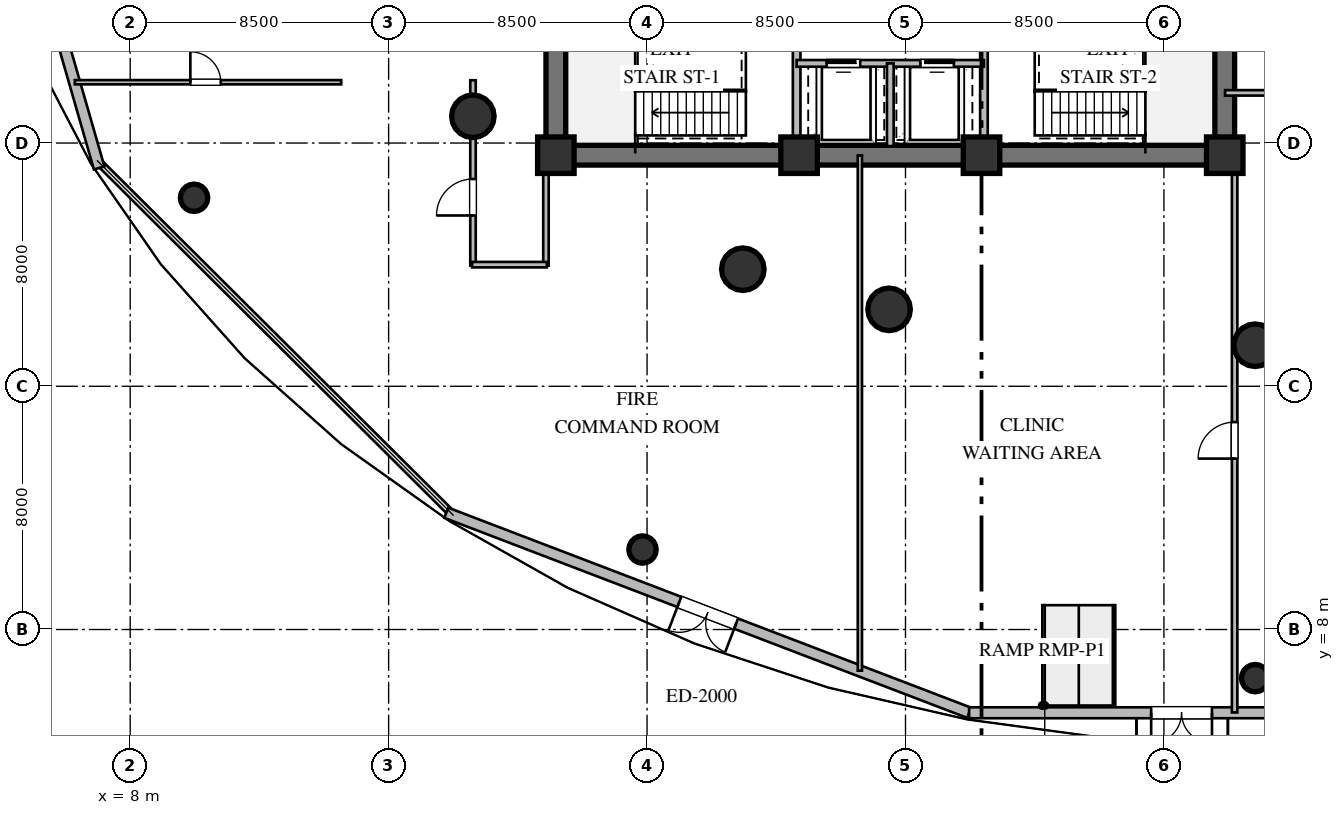
"""IFC4 building model, lengths in metres.
Left out: names, types, materials, properties, quantities, classifications, styles, units other than length and angle.
Written with IfcOpenShell. Run it as: python <this file> out.ifc"""

import sys

from ifc_helpers import new_model, si_unit, direction, frame, frame_2d, origin, origin_2d, place, context, subcontext, project, spatial, rectangle, circle, extrude, element, fill, save


model = new_model("IFC4")
c1 = context("Model", 3, precision=1e-05, world=origin(), true_north=direction((0.0, 1.0)))
c2 = subcontext(c1, "Body", "Model", "MODEL_VIEW")
j1 = project(units=[si_unit("LENGTHUNIT", "METRE"), si_unit("PLANEANGLEUNIT", "RADIAN")], contexts=[c1])
p1 = place(None, origin())
s1 = spatial("IfcSite", under=j1, at=p1, CompositionType="ELEMENT")
p2 = place(p1, origin())
s2 = spatial("IfcBuilding", under=s1, at=p2, CompositionType="ELEMENT")
p3 = place(p2, origin())
s3 = spatial("IfcBuildingStorey", under=s2, at=p3, CompositionType="ELEMENT", Elevation=0.0)
p4 = place(p3, frame((21.675, 23.6, 0.0), z_axis=(0.0, 0.0, 1.0), x_axis=(1.0, 0.0, 0.0)))
e1 = element("IfcWall", 1, at=p4, inside=s3, PredefinedType="SHEAR", context=c2, shape_type="SweptSolid", body=[
    extrude(rectangle(XDim=22.65, YDim=0.65, at=frame_2d((11.325, 0.0))), origin(), (0.0, 0.0, 1.0), 4.52),
])
p5 = place(p3, frame((22.0, 23.925, 0.0), z_axis=(0.0, 0.0, 1.0), x_axis=(0.0, 1.0, 0.0)))
e2 = element("IfcWall", 2, at=p5, inside=s3, PredefinedType="SHEAR", context=c2, shape_type="SweptSolid", body=[
    extrude(rectangle(XDim=12.15, YDim=0.65, at=frame_2d((6.075, 0.0))), origin(), (0.0, 0.0, 1.0), 4.52),
])
p6 = place(p3, frame((44.0, 23.925, 0.0), z_axis=(0.0, 0.0, 1.0), x_axis=(0.0, 1.0, 0.0)))
e3 = element("IfcWall", 3, at=p6, inside=s3, PredefinedType="SHEAR", context=c2, shape_type="SweptSolid", body=[
    extrude(rectangle(XDim=12.15, YDim=0.65, at=frame_2d((6.075, 0.0))), origin(), (0.0, 0.0, 1.0), 4.52),
])
p7 = place(p6, frame((8.775, 0.0, 0.0)))
e4 = element("IfcOpeningElement", 4, at=p7, cuts=e3, PredefinedType="OPENING", context=c2, shape_type="SweptSolid", body=[
    extrude(rectangle(XDim=1.5, YDim=2.15, at=frame_2d((0.75, 1.075))), frame((0.0, 0.335, 0.0), z_axis=(0.0, -1.0, 0.0), x_axis=(1.0, 0.0, 0.0)), (0.0, 0.0, 1.0), 0.67),
])
for number, where, z_axis, x_axis in (
    (5, (22.0, 23.6, 0.0), (0.0, 0.0, 1.0), (1.0, 0.0, 0.0)),
    (6, (30.0, 23.6, 0.0), (0.0, 0.0, 1.0), (1.0, 0.0, 0.0)),
    (7, (36.0, 23.6, 0.0), (0.0, 0.0, 1.0), (1.0, 0.0, 0.0)),
    (8, (44.0, 23.6, 0.0), (0.0, 0.0, 1.0), (1.0, 0.0, 0.0)),
):
    element("IfcColumn", number, at=place(p3, frame(where, z_axis=z_axis, x_axis=x_axis)), inside=s3, PredefinedType="COLUMN", context=c2, shape_type="SweptSolid", body=[
        extrude(rectangle(XDim=1.2, YDim=1.2, at=origin_2d()), origin(), (0.0, 0.0, 1.0), 4.8),
    ])
for number, where, z_axis, x_axis in (
    (9, (19.27, 24.88, 0.0), (0.0, 0.0, 1.0), (1.0, 0.0, 0.0)),
    (10, (28.15, 19.85, 0.0), (0.0, 0.0, 1.0), (1.0, 0.0, 0.0)),
    (11, (32.96, 18.53, 0.0), (0.0, 0.0, 1.0), (1.0, 0.0, 0.0)),
    (12, (45.0, 17.35, 0.0), (0.0, 0.0, 1.0), (1.0, 0.0, 0.0)),
):
    element("IfcColumn", number, at=place(p3, frame(where, z_axis=z_axis, x_axis=x_axis)), inside=s3, PredefinedType="COLUMN", context=c2, shape_type="SweptSolid", body=[
        extrude(circle(Radius=0.7, at=origin_2d()), origin(), (0.0, 0.0, 1.0), 4.8),
    ])
for number, where, z_axis, x_axis in (
    (13, (10.1, 22.2, 0.0), (0.0, 0.0, 1.0), (1.0, 0.0, 0.0)),
    (14, (24.85, 10.63, 0.0), (0.0, 0.0, 1.0), (1.0, 0.0, 0.0)),
    (15, (45.0, 6.4, 0.0), (0.0, 0.0, 1.0), (1.0, 0.0, 0.0)),
):
    element("IfcColumn", number, at=place(p3, frame(where, z_axis=z_axis, x_axis=x_axis)), inside=s3, PredefinedType="COLUMN", context=c2, shape_type="SweptSolid", body=[
        extrude(circle(Radius=0.45, at=origin_2d()), origin(), (0.0, 0.0, 1.0), 4.8),
    ])
p8 = place(p3, frame((2.72, 38.0, 0.0), z_axis=(0.0, 0.0, 1.0), x_axis=(0.276203409751, -0.961099202186, 0.0)))
e16 = element("IfcWall", 16, at=p8, inside=s3, PredefinedType="STANDARD", context=c2, shape_type="SweptSolid", body=[
    extrude(rectangle(XDim=15.42, YDim=0.36, at=frame_2d((7.71, 0.0))), origin(), (0.0, 0.0, 1.0), 4.52),
])
p9 = place(p8, frame((6.81, 0.0, 1.05)))
e17 = element("IfcOpeningElement", 17, at=p9, cuts=e16, PredefinedType="OPENING", context=c2, shape_type="SweptSolid", body=[
    extrude(rectangle(XDim=1.8, YDim=1.7, at=frame_2d((0.9, 0.85))), frame((0.0, 0.19, 0.0), z_axis=(0.0, -1.0, 0.0), x_axis=(1.0, 0.0, 0.0)), (0.0, 0.0, 1.0), 0.38),
])
p10 = place(p3, frame((35.592, 5.262, 0.0), z_axis=(0.0, 0.0, 1.0), x_axis=(-0.934012147289, 0.357241247221, 0.0)))
e18 = element("IfcWall", 18, at=p10, inside=s3, PredefinedType="STANDARD", context=c2, shape_type="SweptSolid", body=[
    extrude(rectangle(XDim=18.411, YDim=0.36, at=frame_2d((9.206, 0.0))), origin(), (0.0, 0.0, 1.0), 4.52),
])
p11 = place(p10, frame((8.205, 0.0, 0.0)))
e19 = element("IfcOpeningElement", 19, at=p11, cuts=e18, PredefinedType="OPENING", context=c2, shape_type="SweptSolid", body=[
    extrude(rectangle(XDim=2.0, YDim=2.2, at=frame_2d((1.0, 1.1))), frame((0.0, 0.19, 0.0), z_axis=(0.0, -1.0, 0.0), x_axis=(1.0, 0.0, 0.0)), (0.0, 0.0, 1.0), 0.38),
])
p12 = place(p3, frame((54.408, 5.262, 0.0), z_axis=(0.0, 0.0, 1.0), x_axis=(-1.0, 0.0, 0.0)))
e20 = element("IfcWall", 20, at=p12, inside=s3, PredefinedType="STANDARD", context=c2, shape_type="SweptSolid", body=[
    extrude(rectangle(XDim=18.816, YDim=0.36, at=frame_2d((9.408, 0.0))), origin(), (0.0, 0.0, 1.0), 4.52),
])
p13 = place(p12, frame((10.828, 0.0, 0.0)))
e21 = element("IfcOpeningElement", 21, at=p13, cuts=e20, PredefinedType="OPENING", context=c2, shape_type="SweptSolid", body=[
    extrude(rectangle(XDim=2.0, YDim=2.2, at=frame_2d((1.0, 1.1))), frame((0.0, 0.19, 0.0), z_axis=(0.0, -1.0, 0.0), x_axis=(1.0, 0.0, 0.0)), (0.0, 0.0, 1.0), 0.38),
])
p14 = place(p3, frame((29.92, 23.9, 0.0), z_axis=(0.0, 0.0, 1.0), x_axis=(0.0, 1.0, 0.0)))
e22 = element("IfcWall", 22, at=p14, inside=s3, PredefinedType="SOLIDWALL", context=c2, shape_type="SweptSolid", body=[
    extrude(rectangle(XDim=5.4, YDim=0.25, at=frame_2d((2.7, 0.0))), origin(), (0.0, 0.0, 1.0), 4.52),
])
p15 = place(p14, frame((3.421, 0.0, 0.0)))
e23 = element("IfcOpeningElement", 23, at=p15, cuts=e22, PredefinedType="OPENING", context=c2, shape_type="SweptSolid", body=[
    extrude(rectangle(XDim=1.15, YDim=2.1, at=frame_2d((0.575, 1.05))), frame((0.0, 0.135, 0.0), z_axis=(0.0, -1.0, 0.0), x_axis=(1.0, 0.0, 0.0)), (0.0, 0.0, 1.0), 0.27),
])
p16 = place(p3, frame((36.08, 23.9, 0.0), z_axis=(0.0, 0.0, 1.0), x_axis=(0.0, 1.0, 0.0)))
e24 = element("IfcWall", 24, at=p16, inside=s3, PredefinedType="SOLIDWALL", context=c2, shape_type="SweptSolid", body=[
    extrude(rectangle(XDim=5.4, YDim=0.25, at=frame_2d((2.7, 0.0))), origin(), (0.0, 0.0, 1.0), 4.52),
])
p17 = place(p16, frame((3.421, 0.0, 0.0)))
e25 = element("IfcOpeningElement", 25, at=p17, cuts=e24, PredefinedType="OPENING", context=c2, shape_type="SweptSolid", body=[
    extrude(rectangle(XDim=1.15, YDim=2.1, at=frame_2d((0.575, 1.05))), frame((0.0, 0.135, 0.0), z_axis=(0.0, -1.0, 0.0), x_axis=(1.0, 0.0, 0.0)), (0.0, 0.0, 1.0), 0.27),
])
p18 = place(p3, frame((29.92, 26.62, 0.0), z_axis=(0.0, 0.0, 1.0), x_axis=(1.0, 0.0, 0.0)))
e26 = element("IfcWall", 26, at=p18, inside=s3, PredefinedType="SOLIDWALL", context=c2, shape_type="SweptSolid", body=[
    extrude(rectangle(XDim=6.16, YDim=0.22, at=frame_2d((3.08, 0.0))), origin(), (0.0, 0.0, 1.0), 4.52),
])
p19 = place(p18, frame((0.99, 0.0, 0.0)))
e27 = element("IfcOpeningElement", 27, at=p19, cuts=e26, PredefinedType="OPENING", context=c2, shape_type="SweptSolid", body=[
    extrude(rectangle(XDim=1.1, YDim=2.1, at=frame_2d((0.55, 1.05))), frame((0.0, 0.12, 0.0), z_axis=(0.0, -1.0, 0.0), x_axis=(1.0, 0.0, 0.0)), (0.0, 0.0, 1.0), 0.24),
])
p20 = place(p18, frame((4.07, 0.0, 0.0)))
e28 = element("IfcOpeningElement", 28, at=p20, cuts=e26, PredefinedType="OPENING", context=c2, shape_type="SweptSolid", body=[
    extrude(rectangle(XDim=1.1, YDim=2.1, at=frame_2d((0.55, 1.05))), frame((0.0, 0.12, 0.0), z_axis=(0.0, -1.0, 0.0), x_axis=(1.0, 0.0, 0.0)), (0.0, 0.0, 1.0), 0.24),
])
p21 = place(p3, frame((33.0, 23.9, 0.0), z_axis=(0.0, 0.0, 1.0), x_axis=(0.0, 1.0, 0.0)))
e29 = element("IfcWall", 29, at=p21, inside=s3, PredefinedType="SOLIDWALL", context=c2, shape_type="SweptSolid", body=[
    extrude(rectangle(XDim=2.72, YDim=0.22, at=frame_2d((1.36, 0.0))), origin(), (0.0, 0.0, 1.0), 4.52),
])
p22 = place(p3, frame((62.415, 25.65, 0.0), z_axis=(0.0, 0.0, 1.0), x_axis=(-1.0, 0.0, 0.0)))
e30 = element("IfcWall", 30, at=p22, inside=s3, PredefinedType="PARTITIONING", context=c2, shape_type="SweptSolid", body=[
    extrude(rectangle(XDim=18.405, YDim=0.18, at=frame_2d((9.203, 0.0))), origin(), (0.0, 0.0, 1.0), 3.966),
])
p23 = place(p22, frame((8.46, 0.0, 0.0)))
e31 = element("IfcOpeningElement", 31, at=p23, cuts=e30, PredefinedType="OPENING", context=c2, shape_type="SweptSolid", body=[
    extrude(rectangle(XDim=1.2, YDim=2.15, at=frame_2d((0.6, 1.075))), frame((0.0, 0.1, 0.0), z_axis=(0.0, -1.0, 0.0), x_axis=(1.0, 0.0, 0.0)), (0.0, 0.0, 1.0), 0.2),
])
p24 = place(p3, frame((19.275, 19.97, 0.0), z_axis=(0.0, 0.0, 1.0), x_axis=(0.0, 1.0, 0.0)))
e32 = element("IfcWall", 32, at=p24, inside=s3, PredefinedType="PARTITIONING", context=c2, shape_type="SweptSolid", body=[
    extrude(rectangle(XDim=6.095, YDim=0.18, at=frame_2d((3.047, 0.0))), origin(), (0.0, 0.0, 1.0), 3.898),
])
p25 = place(p24, frame((1.647, 0.0, 0.0)))
e33 = element("IfcOpeningElement", 33, at=p25, cuts=e32, PredefinedType="OPENING", context=c2, shape_type="SweptSolid", body=[
    extrude(rectangle(XDim=1.2, YDim=2.15, at=frame_2d((0.6, 1.075))), frame((0.0, 0.1, 0.0), z_axis=(0.0, -1.0, 0.0), x_axis=(1.0, 0.0, 0.0)), (0.0, 0.0, 1.0), 0.2),
])
p26 = place(p3, frame((21.675, 23.59, 0.0), z_axis=(0.0, 0.0, 1.0), x_axis=(0.0, -1.0, 0.0)))
e34 = element("IfcWall", 34, at=p26, inside=s3, PredefinedType="PARTITIONING", context=c2, shape_type="SweptSolid", body=[
    extrude(rectangle(XDim=3.62, YDim=0.18, at=frame_2d((1.81, 0.0))), origin(), (0.0, 0.0, 1.0), 3.66),
])
p27 = place(p3, frame((21.705, 20.0, 0.0), z_axis=(0.0, 0.0, 1.0), x_axis=(-1.0, 0.0, 0.0)))
e35 = element("IfcWall", 35, at=p27, inside=s3, PredefinedType="PARTITIONING", context=c2, shape_type="SweptSolid", body=[
    extrude(rectangle(XDim=2.46, YDim=0.18, at=frame_2d((1.23, 0.0))), origin(), (0.0, 0.0, 1.0), 4.52),
])
p28 = place(p3, frame((44.325, 5.272, 0.0), z_axis=(0.0, 0.0, 1.0), x_axis=(0.0, 1.0, 0.0)))
e36 = element("IfcWall", 36, at=p28, inside=s3, PredefinedType="PARTITIONING", context=c2, shape_type="SweptSolid", body=[
    extrude(rectangle(XDim=18.318, YDim=0.18, at=frame_2d((9.159, 0.0))), origin(), (0.0, 0.0, 1.0), 3.66),
])
p29 = place(p28, frame((8.349, 0.0, 0.0)))
e37 = element("IfcOpeningElement", 37, at=p29, cuts=e36, PredefinedType="OPENING", context=c2, shape_type="SweptSolid", body=[
    extrude(rectangle(XDim=1.2, YDim=2.15, at=frame_2d((0.6, 1.075))), frame((0.0, 0.1, 0.0), z_axis=(0.0, -1.0, 0.0), x_axis=(1.0, 0.0, 0.0)), (0.0, 0.0, 1.0), 0.2),
])
p30 = place(p3, frame((6.179, 26.0, 0.0), z_axis=(0.0, 0.0, 1.0), x_axis=(1.0, 0.0, 0.0)))
e38 = element("IfcWall", 38, at=p30, inside=s3, PredefinedType="PARTITIONING", context=c2, shape_type="SweptSolid", body=[
    extrude(rectangle(XDim=8.761, YDim=0.14, at=frame_2d((4.381, 0.0))), origin(), (0.0, 0.0, 1.0), 4.52),
])
p31 = place(p30, frame((3.8, 0.0, 0.0)))
e39 = element("IfcOpeningElement", 39, at=p31, cuts=e38, PredefinedType="OPENING", context=c2, shape_type="SweptSolid", body=[
    extrude(rectangle(XDim=1.0, YDim=2.1, at=frame_2d((0.5, 1.05))), frame((0.0, 0.08, 0.0), z_axis=(0.0, -1.0, 0.0), x_axis=(1.0, 0.0, 0.0)), (0.0, 0.0, 1.0), 0.16),
])
p32 = place(p3, frame((32.0, 23.59, 0.0), z_axis=(0.0, 0.0, 1.0), x_axis=(0.0, -1.0, 0.0)))
e40 = element("IfcWall", 40, at=p32, inside=s3, PredefinedType="PARTITIONING", context=c2, shape_type="SweptSolid", body=[
    extrude(rectangle(XDim=16.944, YDim=0.14, at=frame_2d((8.472, 0.0))), origin(), (0.0, 0.0, 1.0), 4.52),
])
p33 = place(p11, origin())
e41 = element("IfcDoor", 41, at=p33, inside=s3, OperationType="DOUBLE_DOOR_SINGLE_SWING", PredefinedType="DOOR", context=c2, shape_type="SweptSolid", body=[
    extrude(rectangle(XDim=2.0, YDim=2.2, at=frame_2d((1.0, 1.1))), frame((0.0, 0.025, 0.0), z_axis=(0.0, -1.0, 0.0), x_axis=(1.0, 0.0, 0.0)), (0.0, 0.0, 1.0), 0.05),
])
fill(e19, e41)
p34 = place(p13, origin())
e42 = element("IfcDoor", 42, at=p34, inside=s3, OperationType="DOUBLE_DOOR_SINGLE_SWING", PredefinedType="DOOR", context=c2, shape_type="SweptSolid", body=[
    extrude(rectangle(XDim=2.0, YDim=2.2, at=frame_2d((1.0, 1.1))), frame((0.0, 0.025, 0.0), z_axis=(0.0, -1.0, 0.0), x_axis=(1.0, 0.0, 0.0)), (0.0, 0.0, 1.0), 0.05),
])
fill(e21, e42)
p35 = place(p19, origin())
e43 = element("IfcDoor", 43, at=p35, inside=s3, OperationType="SLIDING_TO_LEFT", PredefinedType="DOOR", context=c2, shape_type="SweptSolid", body=[
    extrude(rectangle(XDim=1.1, YDim=2.1, at=frame_2d((0.55, 1.05))), frame((0.0, 0.025, 0.0), z_axis=(0.0, -1.0, 0.0), x_axis=(1.0, 0.0, 0.0)), (0.0, 0.0, 1.0), 0.05),
])
fill(e27, e43)
p36 = place(p20, origin())
e44 = element("IfcDoor", 44, at=p36, inside=s3, OperationType="SLIDING_TO_RIGHT", PredefinedType="DOOR", context=c2, shape_type="SweptSolid", body=[
    extrude(rectangle(XDim=1.1, YDim=2.1, at=frame_2d((0.55, 1.05))), frame((0.0, 0.025, 0.0), z_axis=(0.0, -1.0, 0.0), x_axis=(1.0, 0.0, 0.0)), (0.0, 0.0, 1.0), 0.05),
])
fill(e28, e44)
p37 = place(p25, origin())
e45 = element("IfcDoor", 45, at=p37, inside=s3, OperationType="SINGLE_SWING_LEFT", PredefinedType="DOOR", context=c2, shape_type="SweptSolid", body=[
    extrude(rectangle(XDim=1.2, YDim=2.15, at=frame_2d((0.6, 1.075))), frame((0.0, 0.025, 0.0), z_axis=(0.0, -1.0, 0.0), x_axis=(1.0, 0.0, 0.0)), (0.0, 0.0, 1.0), 0.05),
])
fill(e33, e45)
p38 = place(p29, origin())
e46 = element("IfcDoor", 46, at=p38, inside=s3, OperationType="SINGLE_SWING_LEFT", PredefinedType="DOOR", context=c2, shape_type="SweptSolid", body=[
    extrude(rectangle(XDim=1.2, YDim=2.15, at=frame_2d((0.6, 1.075))), frame((0.0, 0.025, 0.0), z_axis=(0.0, -1.0, 0.0), x_axis=(1.0, 0.0, 0.0)), (0.0, 0.0, 1.0), 0.05),
])
fill(e37, e46)
p39 = place(p31, origin())
e47 = element("IfcDoor", 47, at=p39, inside=s3, OperationType="SINGLE_SWING_LEFT", PredefinedType="DOOR", context=c2, shape_type="SweptSolid", body=[
    extrude(rectangle(XDim=1.0, YDim=2.1, at=frame_2d((0.5, 1.05))), frame((0.0, 0.025, 0.0), z_axis=(0.0, -1.0, 0.0), x_axis=(1.0, 0.0, 0.0)), (0.0, 0.0, 1.0), 0.05),
])
fill(e39, e47)
save(model, sys.argv[1])
